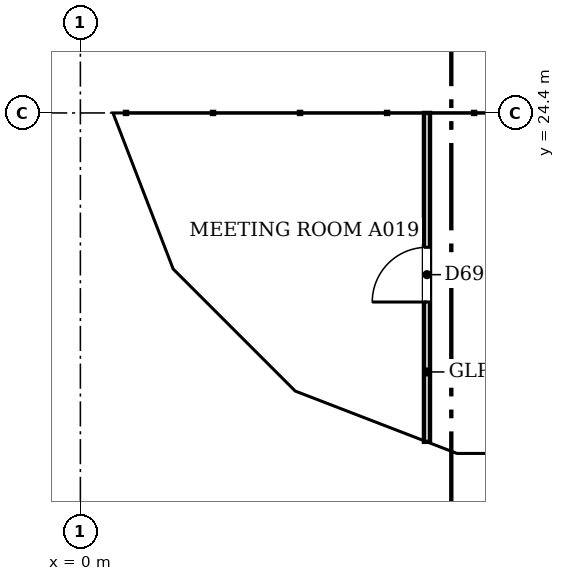
"""IFC4 building model, lengths in metres.
Left out: names, types, materials, properties, quantities, classifications, styles, units other than length and angle.
Written with IfcOpenShell. Run it as: python <this file> out.ifc"""

import sys

from ifc_helpers import new_model, si_unit, direction, frame, frame_2d, origin, place, context, subcontext, project, spatial, polyline, rectangle, outline, extrude, faceted_brep, source, transform, mapped, element, fill, save


model = new_model("IFC4")
c1 = context("Model", 3, precision=1e-05, world=origin(), true_north=direction((0.0, 1.0)))
c2 = subcontext(c1, "Body", "Model", "MODEL_VIEW")
j1 = project(units=[si_unit("LENGTHUNIT", "METRE"), si_unit("PLANEANGLEUNIT", "RADIAN")], contexts=[c1])
p1 = place(None, origin())
s1 = spatial("IfcSite", under=j1, at=p1, CompositionType="ELEMENT")
p2 = place(p1, origin())
s2 = spatial("IfcBuilding", under=s1, at=p2, CompositionType="ELEMENT")
p3 = place(p2, frame((0.0, 0.0, 99.0)))
s3 = spatial("IfcBuildingStorey", under=s2, at=p3, CompositionType="ELEMENT", Elevation=99.0)
m1 = source(origin(), c2, "Body", "Brep", [
    faceted_brep([(3.05, -0.25, 0.0), (6.053, -0.25, 3.8), (3.05, -0.25, 7.6), (0.0, -0.25, 3.8), (0.0, 0.25, 3.8), (3.05, 0.25, 7.6), (6.007, 0.25, 3.859), (6.007, 0.25, 3.741), (3.05, 0.25, 0.0), (6.053, 0.0, 3.8)], [[[0, 1, 2, 3]], [[4, 5, 6, 7, 8]], [[8, 7, 9, 1, 0]], [[6, 5, 2, 1, 9]], [[5, 4, 3, 2]], [[4, 8, 0, 3]], [[9, 7, 6]]]),
])
p4 = place(p3, frame((0.25, 30.5, -3.8), z_axis=(0.0, 0.0, 1.0), x_axis=(0.0, -1.0, 0.0)))
e1 = element("IfcWall", 1, at=p4, inside=s3, PredefinedType="SOLIDWALL", context=c2, shape_type="MappedRepresentation", body=[
    mapped(m1, transform((0.0, 0.0, 0.0), scale=1.0)),
])
m2 = source(origin(), c2, "Body", "SweptSolid", [
    extrude(outline(polyline([(3.049, 0.401), (5.735, 3.8), (3.049, 7.199), (0.321, 3.8), (3.049, 0.401)])), frame((0.0, 0.26, 0.0), z_axis=(0.0, -1.0, 0.0), x_axis=(1.0, 0.0, 0.0)), (0.0, 0.0, 1.0), 0.52),
])
p5 = place(p4, origin())
e2 = element("IfcOpeningElement", 2, at=p5, cuts=e1, PredefinedType="OPENING", context=c2, shape_type="MappedRepresentation", body=[
    mapped(m2, transform((0.0, 0.0, 0.0), scale=1.0)),
])
m3 = source(origin(), c2, "Body", "Brep", [
    faceted_brep([(2.95, -0.25, 0.0), (3.003, -0.25, 0.068), (3.003, -0.25, 7.532), (2.95, -0.25, 7.6), (0.0, -0.25, 3.8), (0.047, 0.25, 3.86), (2.898, 0.25, 7.532), (2.898, 0.25, 0.068), (0.047, 0.25, 3.74), (2.95, 0.0, 0.0), (2.95, 0.0, 7.6), (0.0, 0.0, 3.8)], [[[0, 1, 2, 3, 4]], [[5, 6, 7, 8]], [[1, 0, 9]], [[10, 3, 2]], [[6, 5, 11, 4, 3, 10]], [[8, 7, 9, 0, 4, 11]], [[8, 11, 5]], [[1, 9, 7, 6, 10, 2]]]),
])
p6 = place(p3, frame((0.25, 24.447, -3.8), z_axis=(0.0, 0.0, 1.0), x_axis=(0.35992665181, -0.932980602862, 0.0)))
e3 = element("IfcWall", 3, at=p6, inside=s3, PredefinedType="SOLIDWALL", context=c2, shape_type="MappedRepresentation", body=[
    mapped(m3, transform((0.0, 0.0, 0.0), scale=1.0)),
])
m4 = source(origin(), c2, "Body", "SweptSolid", [
    extrude(outline(polyline([(2.75, 6.935), (0.316, 3.8), (2.75, 0.665), (2.75, 6.935)])), frame((0.0, 0.26, 0.0), z_axis=(0.0, -1.0, 0.0), x_axis=(1.0, 0.0, 0.0)), (0.0, 0.0, 1.0), 0.52),
])
p7 = place(p6, origin())
e4 = element("IfcOpeningElement", 4, at=p7, cuts=e3, PredefinedType="OPENING", context=c2, shape_type="MappedRepresentation", body=[
    mapped(m4, transform((0.0, 0.0, 0.0), scale=1.0)),
])
m5 = source(origin(), c2, "Body", "Brep", [
    faceted_brep([(0.053, -0.25, 0.0), (2.997, -0.25, 3.8), (0.053, -0.25, 7.6), (0.0, -0.25, 7.532), (0.0, -0.25, 0.068), (0.106, 0.25, 7.532), (2.944, 0.25, 3.868), (2.944, 0.25, 3.732), (0.106, 0.25, 0.068), (2.997, 0.0, 3.8), (0.053, 0.0, 0.0), (0.053, 0.0, 7.6)], [[[0, 1, 2, 3, 4]], [[5, 6, 7, 8]], [[8, 7, 9, 1, 0, 10]], [[6, 5, 11, 2, 1, 9]], [[3, 2, 11]], [[10, 0, 4]], [[8, 10, 4, 3, 11, 5]], [[9, 7, 6]]]),
])
p8 = place(p3, frame((1.274, 21.731, -3.8), z_axis=(0.0, 0.0, 1.0), x_axis=(0.707147509625, -0.707066050402, 0.0)))
e5 = element("IfcWall", 5, at=p8, inside=s3, PredefinedType="SOLIDWALL", context=c2, shape_type="MappedRepresentation", body=[
    mapped(m5, transform((0.0, 0.0, 0.0), scale=1.0)),
])
m6 = source(origin(), c2, "Body", "SweptSolid", [
    extrude(outline(polyline([(0.253, 0.666), (2.681, 3.8), (0.253, 6.934), (0.253, 0.666)])), frame((0.0, 0.26, 0.0), z_axis=(0.0, -1.0, 0.0), x_axis=(1.0, 0.0, 0.0)), (0.0, 0.0, 1.0), 0.52),
])
p9 = place(p8, origin())
e6 = element("IfcOpeningElement", 6, at=p9, cuts=e5, PredefinedType="OPENING", context=c2, shape_type="MappedRepresentation", body=[
    mapped(m6, transform((0.0, 0.0, 0.0), scale=1.0)),
])
m7 = source(origin(), c2, "Body", "Brep", [
    faceted_brep([(2.95, -0.25, 0.0), (2.997, -0.25, 0.059), (2.997, -0.25, 7.541), (2.95, -0.25, 7.6), (0.0, -0.25, 3.8), (0.053, 0.25, 3.868), (2.904, 0.25, 7.54), (2.904, 0.25, 0.06), (0.053, 0.25, 3.732), (2.95, 0.0, 0.0), (2.95, 0.0, 7.6), (0.0, 0.0, 3.8)], [[[0, 1, 2, 3, 4]], [[5, 6, 7, 8]], [[1, 0, 9]], [[10, 3, 2]], [[6, 5, 11, 4, 3, 10]], [[8, 7, 9, 0, 4, 11]], [[8, 11, 5]], [[1, 9, 7, 6, 10, 2]]]),
])
p10 = place(p3, frame((3.394, 19.612, -3.8), z_axis=(0.0, 0.0, 1.0), x_axis=(0.932990326376, -0.359901446078, 0.0)))
e7 = element("IfcWall", 7, at=p10, inside=s3, PredefinedType="SOLIDWALL", context=c2, shape_type="MappedRepresentation", body=[
    mapped(m7, transform((0.0, 0.0, 0.0), scale=1.0)),
])
p11 = place(p10, origin())
e8 = element("IfcOpeningElement", 8, at=p11, cuts=e7, PredefinedType="OPENING", context=c2, shape_type="MappedRepresentation", body=[
    mapped(m4, transform((0.0, 0.0, 0.0), scale=1.0)),
])
m8 = source(origin(), c2, "Body", "Brep", [
    faceted_brep([(0.047, -0.25, 0.0), (3.05, -0.25, 3.8), (0.047, -0.25, 7.6), (0.0, -0.25, 7.54), (0.0, -0.25, 0.06), (0.093, 0.25, 7.541), (3.05, 0.25, 3.8), (0.093, 0.25, 0.059), (0.047, 0.0, 0.0), (0.047, 0.0, 7.6)], [[[0, 1, 2, 3, 4]], [[5, 6, 7]], [[7, 6, 1, 0, 8]], [[6, 5, 9, 2, 1]], [[3, 2, 9]], [[8, 0, 4]], [[7, 8, 4, 3, 9, 5]]]),
])
p12 = place(p3, frame((6.1, 18.55, -3.8), z_axis=(0.0, 0.0, 1.0), x_axis=(1.0, 0.0, 0.0)))
e9 = element("IfcWall", 9, at=p12, inside=s3, PredefinedType="SOLIDWALL", context=c2, shape_type="MappedRepresentation", body=[
    mapped(m8, transform((0.0, 0.0, 0.0), scale=1.0)),
])
m9 = source(origin(), c2, "Body", "SweptSolid", [
    extrude(outline(polyline([(0.247, 0.656), (2.731, 3.8), (0.247, 6.944), (0.247, 0.656)])), frame((0.0, 0.26, 0.0), z_axis=(0.0, -1.0, 0.0), x_axis=(1.0, 0.0, 0.0)), (0.0, 0.0, 1.0), 0.52),
])
p13 = place(p12, origin())
e10 = element("IfcOpeningElement", 10, at=p13, cuts=e9, PredefinedType="OPENING", context=c2, shape_type="MappedRepresentation", body=[
    mapped(m9, transform((0.0, 0.0, 0.0), scale=1.0)),
])
p14 = place(p2, frame((0.0, 0.0, 102.8)))
s4 = spatial("IfcBuildingStorey", under=s2, at=p14, CompositionType="ELEMENT", Elevation=102.8)
m10 = source(origin(), c2, "Body", "Brep", [
    faceted_brep([(3.003, -0.25, 0.0), (3.05, -0.25, 0.06), (3.05, -0.25, 7.54), (3.003, -0.25, 7.6), (0.0, -0.25, 3.8), (0.0, 0.25, 3.8), (2.957, 0.25, 7.541), (2.957, 0.25, 0.059), (3.003, 0.0, 0.0), (3.003, 0.0, 7.6)], [[[0, 1, 2, 3, 4]], [[5, 6, 7]], [[1, 0, 8]], [[9, 3, 2]], [[6, 5, 4, 3, 9]], [[5, 7, 8, 0, 4]], [[1, 8, 7, 6, 9, 2]]]),
])
p15 = place(p14, frame((0.25, 27.45, -3.8), z_axis=(0.0, 0.0, 1.0), x_axis=(0.0, -1.0, 0.0)))
e11 = element("IfcWall", 11, at=p15, inside=s4, PredefinedType="SOLIDWALL", context=c2, shape_type="MappedRepresentation", body=[
    mapped(m10, transform((0.0, 0.0, 0.0), scale=1.0)),
])
m11 = source(origin(), c2, "Body", "SweptSolid", [
    extrude(outline(polyline([(2.803, 6.944), (0.319, 3.8), (2.803, 0.656), (2.803, 6.944)])), frame((0.0, 0.26, 0.0), z_axis=(0.0, -1.0, 0.0), x_axis=(1.0, 0.0, 0.0)), (0.0, 0.0, 1.0), 0.52),
])
p16 = place(p15, origin())
e12 = element("IfcOpeningElement", 12, at=p16, cuts=e11, PredefinedType="OPENING", context=c2, shape_type="MappedRepresentation", body=[
    mapped(m11, transform((0.0, 0.0, 0.0), scale=1.0)),
])
m12 = source(origin(), c2, "Body", "Brep", [
    faceted_brep([(0.047, -0.25, 0.0), (2.997, -0.25, 3.8), (0.047, -0.25, 7.6), (0.0, -0.25, 7.541), (0.0, -0.25, 0.059), (0.093, 0.25, 7.54), (2.944, 0.25, 3.868), (2.944, 0.25, 3.732), (0.093, 0.25, 0.06), (2.997, 0.0, 3.8), (0.047, 0.0, 0.0), (0.047, 0.0, 7.6)], [[[0, 1, 2, 3, 4]], [[5, 6, 7, 8]], [[8, 7, 9, 1, 0, 10]], [[6, 5, 11, 2, 1, 9]], [[3, 2, 11]], [[10, 0, 4]], [[8, 10, 4, 3, 11, 5]], [[9, 7, 6]]]),
])
p17 = place(p14, frame((0.233, 24.49, -3.8), z_axis=(0.0, 0.0, 1.0), x_axis=(0.359901446078, -0.932990326376, 0.0)))
e13 = element("IfcWall", 13, at=p17, inside=s4, PredefinedType="SOLIDWALL", context=c2, shape_type="MappedRepresentation", body=[
    mapped(m12, transform((0.0, 0.0, 0.0), scale=1.0)),
])
m13 = source(origin(), c2, "Body", "SweptSolid", [
    extrude(outline(polyline([(0.247, 0.665), (2.681, 3.8), (0.247, 6.935), (0.247, 0.665)])), frame((0.0, 0.26, 0.0), z_axis=(0.0, -1.0, 0.0), x_axis=(1.0, 0.0, 0.0)), (0.0, 0.0, 1.0), 0.52),
])
p18 = place(p17, origin())
e14 = element("IfcOpeningElement", 14, at=p18, cuts=e13, PredefinedType="OPENING", context=c2, shape_type="MappedRepresentation", body=[
    mapped(m13, transform((0.0, 0.0, 0.0), scale=1.0)),
])
m14 = source(origin(), c2, "Body", "Brep", [
    faceted_brep([(2.944, -0.25, 0.0), (2.997, -0.25, 0.068), (2.997, -0.25, 7.532), (2.944, -0.25, 7.6), (0.0, -0.25, 3.8), (0.053, 0.25, 3.868), (2.891, 0.25, 7.532), (2.891, 0.25, 0.068), (0.053, 0.25, 3.732), (2.944, 0.0, 0.0), (2.944, 0.0, 7.6), (0.0, 0.0, 3.8)], [[[0, 1, 2, 3, 4]], [[5, 6, 7, 8]], [[1, 0, 9]], [[10, 3, 2]], [[6, 5, 11, 4, 3, 10]], [[8, 7, 9, 0, 4, 11]], [[8, 11, 5]], [[1, 9, 7, 6, 10, 2]]]),
])
p19 = place(p14, frame((1.312, 21.694, -3.8), z_axis=(0.0, 0.0, 1.0), x_axis=(0.707066050402, -0.707147509625, 0.0)))
e15 = element("IfcWall", 15, at=p19, inside=s4, PredefinedType="SOLIDWALL", context=c2, shape_type="MappedRepresentation", body=[
    mapped(m14, transform((0.0, 0.0, 0.0), scale=1.0)),
])
m15 = source(origin(), c2, "Body", "SweptSolid", [
    extrude(outline(polyline([(2.744, 6.934), (0.316, 3.8), (2.744, 0.666), (2.744, 6.934)])), frame((0.0, 0.26, 0.0), z_axis=(0.0, -1.0, 0.0), x_axis=(1.0, 0.0, 0.0)), (0.0, 0.0, 1.0), 0.52),
])
p20 = place(p19, origin())
e16 = element("IfcOpeningElement", 16, at=p20, cuts=e15, PredefinedType="OPENING", context=c2, shape_type="MappedRepresentation", body=[
    mapped(m15, transform((0.0, 0.0, 0.0), scale=1.0)),
])
m16 = source(origin(), c2, "Body", "Brep", [
    faceted_brep([(0.053, -0.25, 0.0), (3.003, -0.25, 3.8), (0.053, -0.25, 7.6), (0.0, -0.25, 7.532), (0.0, -0.25, 0.068), (0.106, 0.25, 7.532), (2.957, 0.25, 3.86), (2.957, 0.25, 3.74), (0.106, 0.25, 0.068), (3.003, 0.0, 3.8), (0.053, 0.0, 0.0), (0.053, 0.0, 7.6)], [[[0, 1, 2, 3, 4]], [[5, 6, 7, 8]], [[8, 7, 9, 1, 0, 10]], [[6, 5, 11, 2, 1, 9]], [[3, 2, 11]], [[10, 0, 4]], [[8, 10, 4, 3, 11, 5]], [[9, 7, 6]]]),
])
p21 = place(p14, frame((3.344, 19.631, -3.8), z_axis=(0.0, 0.0, 1.0), x_axis=(0.933007896601, -0.359855894603, 0.0)))
e17 = element("IfcWall", 17, at=p21, inside=s4, PredefinedType="SOLIDWALL", context=c2, shape_type="MappedRepresentation", body=[
    mapped(m16, transform((0.0, 0.0, 0.0), scale=1.0)),
])
m17 = source(origin(), c2, "Body", "SweptSolid", [
    extrude(outline(polyline([(0.253, 0.665), (2.687, 3.8), (0.253, 6.935), (0.253, 0.665)])), frame((0.0, 0.26, 0.0), z_axis=(0.0, -1.0, 0.0), x_axis=(1.0, 0.0, 0.0)), (0.0, 0.0, 1.0), 0.52),
])
p22 = place(p21, origin())
e18 = element("IfcOpeningElement", 18, at=p22, cuts=e17, PredefinedType="OPENING", context=c2, shape_type="MappedRepresentation", body=[
    mapped(m17, transform((0.0, 0.0, 0.0), scale=1.0)),
])
m18 = source(origin(), c2, "Body", "Brep", [
    faceted_brep([(3.003, -0.25, 0.0), (6.053, -0.25, 3.8), (3.003, -0.25, 7.6), (0.0, -0.25, 3.8), (0.047, 0.25, 3.859), (3.003, 0.25, 7.6), (6.053, 0.25, 3.8), (3.003, 0.25, 0.0), (0.047, 0.25, 3.741), (0.0, 0.0, 3.8)], [[[0, 1, 2, 3]], [[4, 5, 6, 7, 8]], [[7, 6, 1, 0]], [[6, 5, 2, 1]], [[5, 4, 9, 3, 2]], [[8, 7, 0, 3, 9]], [[8, 9, 4]]]),
])
p23 = place(p14, frame((6.146, 18.55, -3.8), z_axis=(0.0, 0.0, 1.0), x_axis=(1.0, 0.0, 0.0)))
e19 = element("IfcWall", 19, at=p23, inside=s4, PredefinedType="SOLIDWALL", context=c2, shape_type="MappedRepresentation", body=[
    mapped(m18, transform((0.0, 0.0, 0.0), scale=1.0)),
])
m19 = source(origin(), c2, "Body", "SweptSolid", [
    extrude(outline(polyline([(3.005, 0.401), (5.733, 3.8), (3.005, 7.199), (0.319, 3.8), (3.005, 0.401)])), frame((0.0, 0.26, 0.0), z_axis=(0.0, -1.0, 0.0), x_axis=(1.0, 0.0, 0.0)), (0.0, 0.0, 1.0), 0.52),
])
p24 = place(p23, origin())
e20 = element("IfcOpeningElement", 20, at=p24, cuts=e19, PredefinedType="OPENING", context=c2, shape_type="MappedRepresentation", body=[
    mapped(m19, transform((0.0, 0.0, 0.0), scale=1.0)),
])
p25 = place(p3, frame((5.7, 18.99, 0.0), z_axis=(0.0, 0.0, 1.0), x_axis=(0.0, 1.0, 0.0)))
e21 = element("IfcWall", 21, at=p25, inside=s3, PredefinedType="PARTITIONING", context=c2, shape_type="SweptSolid", body=[
    extrude(rectangle(XDim=5.41, YDim=0.1, at=frame_2d((2.705, 0.0))), origin(), (0.0, 0.0, 1.0), 3.067),
])
m20 = source(origin(), c2, "Body", "SweptSolid", [
    extrude(rectangle(XDim=0.9, YDim=2.1, at=frame_2d((0.45, 1.05))), frame((0.0, 0.06, 0.0), z_axis=(0.0, -1.0, 0.0), x_axis=(1.0, 0.0, 0.0)), (0.0, 0.0, 1.0), 0.12),
])
p26 = place(p25, frame((2.3, 0.0, 0.0)))
e22 = element("IfcOpeningElement", 22, at=p26, cuts=e21, PredefinedType="OPENING", context=c2, shape_type="MappedRepresentation", body=[
    mapped(m20, transform((0.0, 0.0, 0.0), scale=1.0)),
])
m21 = source(origin(), c2, "Body", "SweptSolid", [
    extrude(rectangle(XDim=0.9, YDim=2.1, at=frame_2d((0.45, 1.05))), frame((0.0, 0.025, 0.0), z_axis=(0.0, -1.0, 0.0), x_axis=(1.0, 0.0, 0.0)), (0.0, 0.0, 1.0), 0.05),
])
p27 = place(p26, origin())
e23 = element("IfcDoor", 23, at=p27, inside=s3, OperationType="SINGLE_SWING_LEFT", PredefinedType="DOOR", context=c2, shape_type="MappedRepresentation", body=[
    mapped(m21, transform((0.0, 0.0, 0.0), scale=1.0)),
])
fill(e22, e23)
save(model, sys.argv[1])
